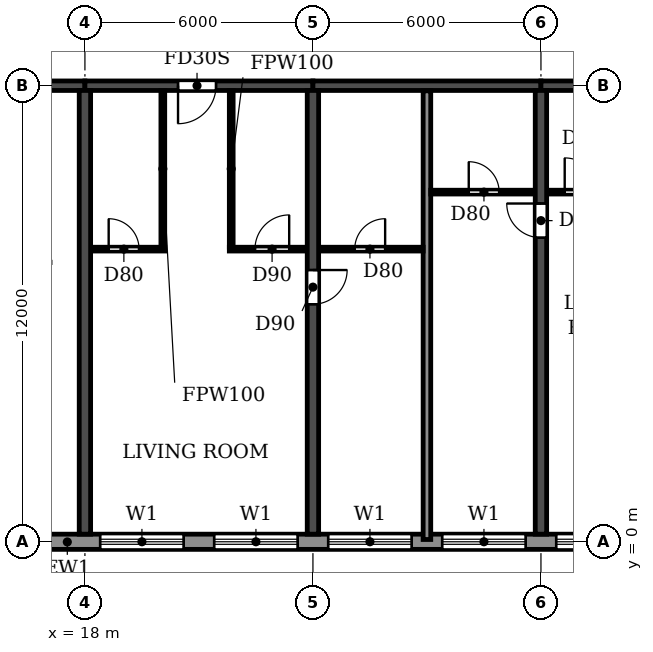
"""IFC4 building model, lengths in metres.
Left out: names, types, materials, properties, quantities, classifications, styles, units other than length and angle.
Written with IfcOpenShell. Run it as: python <this file> out.ifc"""

import sys

from ifc_helpers import new_model, si_unit, direction, frame, frame_2d, origin, place, context, subcontext, project, spatial, rectangle, extrude, element, fill, save


model = new_model("IFC4")
c1 = context("Model", 3, precision=1e-05, world=origin(), true_north=direction((0.0, 1.0)))
c2 = subcontext(c1, "Body", "Model", "MODEL_VIEW")
j1 = project(units=[si_unit("LENGTHUNIT", "METRE"), si_unit("PLANEANGLEUNIT", "RADIAN")], contexts=[c1])
p1 = place(None, origin())
s1 = spatial("IfcSite", under=j1, at=p1, CompositionType="ELEMENT")
p2 = place(p1, origin())
s2 = spatial("IfcBuilding", under=s1, at=p2, CompositionType="ELEMENT")
p3 = place(p2, frame((0.0, 0.0, 125.7)))
s3 = spatial("IfcBuildingStorey", under=s2, at=p3, CompositionType="ELEMENT", Elevation=125.7)
p4 = place(p3, frame((18.0, 0.2, 0.0), z_axis=(0.0, 0.0, 1.0), x_axis=(0.0, 1.0, 0.0)))
e1 = element("IfcWall", 1, at=p4, inside=s3, PredefinedType="SHEAR", context=c2, shape_type="SweptSolid", body=[
    extrude(rectangle(XDim=11.675, YDim=0.3, at=frame_2d((5.837, 0.0))), origin(), (0.0, 0.0, 1.0), 3.07),
])
p5 = place(p3, frame((24.0, 0.2, 0.0), z_axis=(0.0, 0.0, 1.0), x_axis=(0.0, 1.0, 0.0)))
e2 = element("IfcWall", 2, at=p5, inside=s3, PredefinedType="SHEAR", context=c2, shape_type="SweptSolid", body=[
    extrude(rectangle(XDim=11.675, YDim=0.3, at=frame_2d((5.837, 0.0))), origin(), (0.0, 0.0, 1.0), 3.07),
])
p6 = place(p5, frame((6.05, 0.0, 0.0)))
e3 = element("IfcOpeningElement", 3, at=p6, cuts=e2, PredefinedType="OPENING", context=c2, shape_type="SweptSolid", body=[
    extrude(rectangle(XDim=0.9, YDim=2.1, at=frame_2d((0.45, 1.05))), frame((0.0, 0.16, 0.0), z_axis=(0.0, -1.0, 0.0), x_axis=(1.0, 0.0, 0.0)), (0.0, 0.0, 1.0), 0.32),
])
p7 = place(p3, frame((30.0, 0.2, 0.0), z_axis=(0.0, 0.0, 1.0), x_axis=(0.0, 1.0, 0.0)))
e4 = element("IfcWall", 4, at=p7, inside=s3, PredefinedType="SHEAR", context=c2, shape_type="SweptSolid", body=[
    extrude(rectangle(XDim=11.675, YDim=0.3, at=frame_2d((5.837, 0.0))), origin(), (0.0, 0.0, 1.0), 3.07),
])
p8 = place(p7, frame((7.8, 0.0, 0.0)))
e5 = element("IfcOpeningElement", 5, at=p8, cuts=e4, PredefinedType="OPENING", context=c2, shape_type="SweptSolid", body=[
    extrude(rectangle(XDim=0.9, YDim=2.1, at=frame_2d((0.45, 1.05))), frame((0.0, 0.16, 0.0), z_axis=(0.0, -1.0, 0.0), x_axis=(1.0, 0.0, 0.0)), (0.0, 0.0, 1.0), 0.32),
])
p9 = place(p3, frame((12.2, 12.0, 0.0), z_axis=(0.0, 0.0, 1.0), x_axis=(1.0, 0.0, 0.0)))
e6 = element("IfcWall", 6, at=p9, inside=s3, PredefinedType="SHEAR", context=c2, shape_type="SweptSolid", body=[
    extrude(rectangle(XDim=5.8, YDim=0.25, at=frame_2d((2.9, 0.0))), origin(), (0.0, 0.0, 1.0), 2.47),
])
p10 = place(p9, frame((2.3, 0.0, 0.0)))
e7 = element("IfcOpeningElement", 7, at=p10, cuts=e6, PredefinedType="OPENING", context=c2, shape_type="SweptSolid", body=[
    extrude(rectangle(XDim=1.0, YDim=2.1, at=frame_2d((0.5, 1.05))), frame((0.0, 0.135, 0.0), z_axis=(0.0, -1.0, 0.0), x_axis=(1.0, 0.0, 0.0)), (0.0, 0.0, 1.0), 0.27),
])
p11 = place(p3, frame((18.0, 12.0, 0.0), z_axis=(0.0, 0.0, 1.0), x_axis=(1.0, 0.0, 0.0)))
e8 = element("IfcWall", 8, at=p11, inside=s3, PredefinedType="SHEAR", context=c2, shape_type="SweptSolid", body=[
    extrude(rectangle(XDim=6.0, YDim=0.25, at=frame_2d((3.0, 0.0))), origin(), (0.0, 0.0, 1.0), 2.47),
])
p12 = place(p11, frame((2.45, 0.0, 0.0)))
e9 = element("IfcOpeningElement", 9, at=p12, cuts=e8, PredefinedType="OPENING", context=c2, shape_type="SweptSolid", body=[
    extrude(rectangle(XDim=1.0, YDim=2.1, at=frame_2d((0.5, 1.05))), frame((0.0, 0.135, 0.0), z_axis=(0.0, -1.0, 0.0), x_axis=(1.0, 0.0, 0.0)), (0.0, 0.0, 1.0), 0.27),
])
p13 = place(p3, frame((24.0, 12.0, 0.0), z_axis=(0.0, 0.0, 1.0), x_axis=(1.0, 0.0, 0.0)))
e10 = element("IfcWall", 10, at=p13, inside=s3, PredefinedType="SHEAR", context=c2, shape_type="SweptSolid", body=[
    extrude(rectangle(XDim=6.0, YDim=0.25, at=frame_2d((3.0, 0.0))), origin(), (0.0, 0.0, 1.0), 2.47),
])
p14 = place(p3, frame((30.0, 12.0, 0.0), z_axis=(0.0, 0.0, 1.0), x_axis=(1.0, 0.0, 0.0)))
e11 = element("IfcWall", 11, at=p14, inside=s3, PredefinedType="SHEAR", context=c2, shape_type="SweptSolid", body=[
    extrude(rectangle(XDim=6.0, YDim=0.25, at=frame_2d((3.0, 0.0))), origin(), (0.0, 0.0, 1.0), 2.47),
])
p15 = place(p14, frame((2.55, 0.0, 0.0)))
e12 = element("IfcOpeningElement", 12, at=p15, cuts=e11, PredefinedType="OPENING", context=c2, shape_type="SweptSolid", body=[
    extrude(rectangle(XDim=1.0, YDim=2.1, at=frame_2d((0.5, 1.05))), frame((0.0, 0.135, 0.0), z_axis=(0.0, -1.0, 0.0), x_axis=(1.0, 0.0, 0.0)), (0.0, 0.0, 1.0), 0.27),
])
p16 = place(p3, frame((16.683, 0.0, 0.0), z_axis=(0.0, 0.0, 1.0), x_axis=(1.0, 0.0, 0.0)))
e13 = element("IfcWall", 13, at=p16, inside=s3, PredefinedType="STANDARD", context=c2, shape_type="SweptSolid", body=[
    extrude(rectangle(XDim=68.634, YDim=0.4, at=frame_2d((34.317, 0.0))), origin(), (0.0, 0.0, 1.0), 3.07),
])
p17 = place(p16, frame((1.717, 0.0, 0.9)))
e14 = element("IfcOpeningElement", 14, at=p17, cuts=e13, PredefinedType="OPENING", context=c2, shape_type="SweptSolid", body=[
    extrude(rectangle(XDim=2.2, YDim=1.5, at=frame_2d((1.1, 0.75))), frame((0.0, 0.21, 0.0), z_axis=(0.0, -1.0, 0.0), x_axis=(1.0, 0.0, 0.0)), (0.0, 0.0, 1.0), 0.42),
])
p18 = place(p16, frame((4.717, 0.0, 0.9)))
e15 = element("IfcOpeningElement", 15, at=p18, cuts=e13, PredefinedType="OPENING", context=c2, shape_type="SweptSolid", body=[
    extrude(rectangle(XDim=2.2, YDim=1.5, at=frame_2d((1.1, 0.75))), frame((0.0, 0.21, 0.0), z_axis=(0.0, -1.0, 0.0), x_axis=(1.0, 0.0, 0.0)), (0.0, 0.0, 1.0), 0.42),
])
p19 = place(p16, frame((7.717, 0.0, 0.9)))
e16 = element("IfcOpeningElement", 16, at=p19, cuts=e13, PredefinedType="OPENING", context=c2, shape_type="SweptSolid", body=[
    extrude(rectangle(XDim=2.2, YDim=1.5, at=frame_2d((1.1, 0.75))), frame((0.0, 0.21, 0.0), z_axis=(0.0, -1.0, 0.0), x_axis=(1.0, 0.0, 0.0)), (0.0, 0.0, 1.0), 0.42),
])
p20 = place(p16, frame((10.717, 0.0, 0.9)))
e17 = element("IfcOpeningElement", 17, at=p20, cuts=e13, PredefinedType="OPENING", context=c2, shape_type="SweptSolid", body=[
    extrude(rectangle(XDim=2.2, YDim=1.5, at=frame_2d((1.1, 0.75))), frame((0.0, 0.21, 0.0), z_axis=(0.0, -1.0, 0.0), x_axis=(1.0, 0.0, 0.0)), (0.0, 0.0, 1.0), 0.42),
])
p21 = place(p16, frame((13.717, 0.0, 0.9)))
e18 = element("IfcOpeningElement", 18, at=p21, cuts=e13, PredefinedType="OPENING", context=c2, shape_type="SweptSolid", body=[
    extrude(rectangle(XDim=2.2, YDim=1.5, at=frame_2d((1.1, 0.75))), frame((0.0, 0.21, 0.0), z_axis=(0.0, -1.0, 0.0), x_axis=(1.0, 0.0, 0.0)), (0.0, 0.0, 1.0), 0.42),
])
p22 = place(p16, frame((16.717, 0.0, 0.9)))
e19 = element("IfcOpeningElement", 19, at=p22, cuts=e13, PredefinedType="OPENING", context=c2, shape_type="SweptSolid", body=[
    extrude(rectangle(XDim=2.2, YDim=1.5, at=frame_2d((1.1, 0.75))), frame((0.0, 0.21, 0.0), z_axis=(0.0, -1.0, 0.0), x_axis=(1.0, 0.0, 0.0)), (0.0, 0.0, 1.0), 0.42),
])
p23 = place(p16, frame((19.717, 0.0, 0.9)))
e20 = element("IfcOpeningElement", 20, at=p23, cuts=e13, PredefinedType="OPENING", context=c2, shape_type="SweptSolid", body=[
    extrude(rectangle(XDim=2.2, YDim=1.5, at=frame_2d((1.1, 0.75))), frame((0.0, 0.21, 0.0), z_axis=(0.0, -1.0, 0.0), x_axis=(1.0, 0.0, 0.0)), (0.0, 0.0, 1.0), 0.42),
])
p24 = place(p16, frame((22.917, 0.0, 0.0)))
e21 = element("IfcOpeningElement", 21, at=p24, cuts=e13, PredefinedType="OPENING", context=c2, shape_type="SweptSolid", body=[
    extrude(rectangle(XDim=1.8, YDim=2.4, at=frame_2d((0.9, 1.2))), frame((0.0, 0.21, 0.0), z_axis=(0.0, -1.0, 0.0), x_axis=(1.0, 0.0, 0.0)), (0.0, 0.0, 1.0), 0.42),
])
p25 = place(p16, frame((25.717, 0.0, 0.9)))
e22 = element("IfcOpeningElement", 22, at=p25, cuts=e13, PredefinedType="OPENING", context=c2, shape_type="SweptSolid", body=[
    extrude(rectangle(XDim=2.2, YDim=1.5, at=frame_2d((1.1, 0.75))), frame((0.0, 0.21, 0.0), z_axis=(0.0, -1.0, 0.0), x_axis=(1.0, 0.0, 0.0)), (0.0, 0.0, 1.0), 0.42),
])
p26 = place(p16, frame((28.717, 0.0, 0.9)))
e23 = element("IfcOpeningElement", 23, at=p26, cuts=e13, PredefinedType="OPENING", context=c2, shape_type="SweptSolid", body=[
    extrude(rectangle(XDim=2.2, YDim=1.5, at=frame_2d((1.1, 0.75))), frame((0.0, 0.21, 0.0), z_axis=(0.0, -1.0, 0.0), x_axis=(1.0, 0.0, 0.0)), (0.0, 0.0, 1.0), 0.42),
])
p27 = place(p16, frame((31.717, 0.0, 0.9)))
e24 = element("IfcOpeningElement", 24, at=p27, cuts=e13, PredefinedType="OPENING", context=c2, shape_type="SweptSolid", body=[
    extrude(rectangle(XDim=2.2, YDim=1.5, at=frame_2d((1.1, 0.75))), frame((0.0, 0.21, 0.0), z_axis=(0.0, -1.0, 0.0), x_axis=(1.0, 0.0, 0.0)), (0.0, 0.0, 1.0), 0.42),
])
p28 = place(p16, frame((34.917, 0.0, 0.0)))
e25 = element("IfcOpeningElement", 25, at=p28, cuts=e13, PredefinedType="OPENING", context=c2, shape_type="SweptSolid", body=[
    extrude(rectangle(XDim=1.8, YDim=2.4, at=frame_2d((0.9, 1.2))), frame((0.0, 0.21, 0.0), z_axis=(0.0, -1.0, 0.0), x_axis=(1.0, 0.0, 0.0)), (0.0, 0.0, 1.0), 0.42),
])
p29 = place(p16, frame((37.717, 0.0, 0.9)))
e26 = element("IfcOpeningElement", 26, at=p29, cuts=e13, PredefinedType="OPENING", context=c2, shape_type="SweptSolid", body=[
    extrude(rectangle(XDim=2.2, YDim=1.5, at=frame_2d((1.1, 0.75))), frame((0.0, 0.21, 0.0), z_axis=(0.0, -1.0, 0.0), x_axis=(1.0, 0.0, 0.0)), (0.0, 0.0, 1.0), 0.42),
])
p30 = place(p16, frame((40.717, 0.0, 0.9)))
e27 = element("IfcOpeningElement", 27, at=p30, cuts=e13, PredefinedType="OPENING", context=c2, shape_type="SweptSolid", body=[
    extrude(rectangle(XDim=2.2, YDim=1.5, at=frame_2d((1.1, 0.75))), frame((0.0, 0.21, 0.0), z_axis=(0.0, -1.0, 0.0), x_axis=(1.0, 0.0, 0.0)), (0.0, 0.0, 1.0), 0.42),
])
p31 = place(p16, frame((43.717, 0.0, 0.9)))
e28 = element("IfcOpeningElement", 28, at=p31, cuts=e13, PredefinedType="OPENING", context=c2, shape_type="SweptSolid", body=[
    extrude(rectangle(XDim=2.2, YDim=1.5, at=frame_2d((1.1, 0.75))), frame((0.0, 0.21, 0.0), z_axis=(0.0, -1.0, 0.0), x_axis=(1.0, 0.0, 0.0)), (0.0, 0.0, 1.0), 0.42),
])
p32 = place(p16, frame((46.917, 0.0, 0.0)))
e29 = element("IfcOpeningElement", 29, at=p32, cuts=e13, PredefinedType="OPENING", context=c2, shape_type="SweptSolid", body=[
    extrude(rectangle(XDim=1.8, YDim=2.4, at=frame_2d((0.9, 1.2))), frame((0.0, 0.21, 0.0), z_axis=(0.0, -1.0, 0.0), x_axis=(1.0, 0.0, 0.0)), (0.0, 0.0, 1.0), 0.42),
])
p33 = place(p16, frame((49.717, 0.0, 0.9)))
e30 = element("IfcOpeningElement", 30, at=p33, cuts=e13, PredefinedType="OPENING", context=c2, shape_type="SweptSolid", body=[
    extrude(rectangle(XDim=2.2, YDim=1.5, at=frame_2d((1.1, 0.75))), frame((0.0, 0.21, 0.0), z_axis=(0.0, -1.0, 0.0), x_axis=(1.0, 0.0, 0.0)), (0.0, 0.0, 1.0), 0.42),
])
p34 = place(p16, frame((52.717, 0.0, 0.9)))
e31 = element("IfcOpeningElement", 31, at=p34, cuts=e13, PredefinedType="OPENING", context=c2, shape_type="SweptSolid", body=[
    extrude(rectangle(XDim=2.2, YDim=1.5, at=frame_2d((1.1, 0.75))), frame((0.0, 0.21, 0.0), z_axis=(0.0, -1.0, 0.0), x_axis=(1.0, 0.0, 0.0)), (0.0, 0.0, 1.0), 0.42),
])
p35 = place(p16, frame((55.717, 0.0, 0.9)))
e32 = element("IfcOpeningElement", 32, at=p35, cuts=e13, PredefinedType="OPENING", context=c2, shape_type="SweptSolid", body=[
    extrude(rectangle(XDim=2.2, YDim=1.5, at=frame_2d((1.1, 0.75))), frame((0.0, 0.21, 0.0), z_axis=(0.0, -1.0, 0.0), x_axis=(1.0, 0.0, 0.0)), (0.0, 0.0, 1.0), 0.42),
])
p36 = place(p16, frame((58.917, 0.0, 0.0)))
e33 = element("IfcOpeningElement", 33, at=p36, cuts=e13, PredefinedType="OPENING", context=c2, shape_type="SweptSolid", body=[
    extrude(rectangle(XDim=1.8, YDim=2.4, at=frame_2d((0.9, 1.2))), frame((0.0, 0.21, 0.0), z_axis=(0.0, -1.0, 0.0), x_axis=(1.0, 0.0, 0.0)), (0.0, 0.0, 1.0), 0.42),
])
p37 = place(p16, frame((61.717, 0.0, 0.9)))
e34 = element("IfcOpeningElement", 34, at=p37, cuts=e13, PredefinedType="OPENING", context=c2, shape_type="SweptSolid", body=[
    extrude(rectangle(XDim=2.2, YDim=1.5, at=frame_2d((1.1, 0.75))), frame((0.0, 0.21, 0.0), z_axis=(0.0, -1.0, 0.0), x_axis=(1.0, 0.0, 0.0)), (0.0, 0.0, 1.0), 0.42),
])
p38 = place(p16, frame((64.717, 0.0, 0.9)))
e35 = element("IfcOpeningElement", 35, at=p38, cuts=e13, PredefinedType="OPENING", context=c2, shape_type="SweptSolid", body=[
    extrude(rectangle(XDim=2.2, YDim=1.5, at=frame_2d((1.1, 0.75))), frame((0.0, 0.21, 0.0), z_axis=(0.0, -1.0, 0.0), x_axis=(1.0, 0.0, 0.0)), (0.0, 0.0, 1.0), 0.42),
])
p39 = place(p3, frame((27.0, 0.06, 0.0), z_axis=(0.0, 0.0, 1.0), x_axis=(0.0, 1.0, 0.0)))
e36 = element("IfcWall", 36, at=p39, inside=s3, PredefinedType="PARTITIONING", context=c2, shape_type="SweptSolid", body=[
    extrude(rectangle(XDim=11.805, YDim=0.2, at=frame_2d((5.902, 0.0))), origin(), (0.0, 0.0, 1.0), 3.07),
])
p40 = place(p3, frame((18.16, 7.7, 0.0), z_axis=(0.0, 0.0, 1.0), x_axis=(1.0, 0.0, 0.0)))
e37 = element("IfcWall", 37, at=p40, inside=s3, PredefinedType="PARTITIONING", context=c2, shape_type="SweptSolid", body=[
    extrude(rectangle(XDim=1.94, YDim=0.1, at=frame_2d((0.97, 0.0))), origin(), (0.0, 0.0, 1.0), 3.07),
])
p41 = place(p40, frame((0.465, 0.0, 0.0)))
e38 = element("IfcOpeningElement", 38, at=p41, cuts=e37, PredefinedType="OPENING", context=c2, shape_type="SweptSolid", body=[
    extrude(rectangle(XDim=0.8, YDim=2.1, at=frame_2d((0.4, 1.05))), frame((0.0, 0.06, 0.0), z_axis=(0.0, -1.0, 0.0), x_axis=(1.0, 0.0, 0.0)), (0.0, 0.0, 1.0), 0.12),
])
p42 = place(p3, frame((21.8, 7.7, 0.0), z_axis=(0.0, 0.0, 1.0), x_axis=(1.0, 0.0, 0.0)))
e39 = element("IfcWall", 39, at=p42, inside=s3, PredefinedType="PARTITIONING", context=c2, shape_type="SweptSolid", body=[
    extrude(rectangle(XDim=2.04, YDim=0.1, at=frame_2d((1.02, 0.0))), origin(), (0.0, 0.0, 1.0), 3.07),
])
p43 = place(p42, frame((0.675, 0.0, 0.0)))
e40 = element("IfcOpeningElement", 40, at=p43, cuts=e39, PredefinedType="OPENING", context=c2, shape_type="SweptSolid", body=[
    extrude(rectangle(XDim=0.9, YDim=2.1, at=frame_2d((0.45, 1.05))), frame((0.0, 0.06, 0.0), z_axis=(0.0, -1.0, 0.0), x_axis=(1.0, 0.0, 0.0)), (0.0, 0.0, 1.0), 0.12),
])
p44 = place(p3, frame((24.16, 7.7, 0.0), z_axis=(0.0, 0.0, 1.0), x_axis=(1.0, 0.0, 0.0)))
e41 = element("IfcWall", 41, at=p44, inside=s3, PredefinedType="PARTITIONING", context=c2, shape_type="SweptSolid", body=[
    extrude(rectangle(XDim=2.74, YDim=0.1, at=frame_2d((1.37, 0.0))), origin(), (0.0, 0.0, 1.0), 3.07),
])
p45 = place(p44, frame((0.94, 0.0, 0.0)))
e42 = element("IfcOpeningElement", 42, at=p45, cuts=e41, PredefinedType="OPENING", context=c2, shape_type="SweptSolid", body=[
    extrude(rectangle(XDim=0.8, YDim=2.1, at=frame_2d((0.4, 1.05))), frame((0.0, 0.06, 0.0), z_axis=(0.0, -1.0, 0.0), x_axis=(1.0, 0.0, 0.0)), (0.0, 0.0, 1.0), 0.12),
])
p46 = place(p3, frame((27.1, 9.2, 0.0), z_axis=(0.0, 0.0, 1.0), x_axis=(1.0, 0.0, 0.0)))
e43 = element("IfcWall", 43, at=p46, inside=s3, PredefinedType="PARTITIONING", context=c2, shape_type="SweptSolid", body=[
    extrude(rectangle(XDim=2.74, YDim=0.1, at=frame_2d((1.37, 0.0))), origin(), (0.0, 0.0, 1.0), 3.07),
])
p47 = place(p46, frame((1.0, 0.0, 0.0)))
e44 = element("IfcOpeningElement", 44, at=p47, cuts=e43, PredefinedType="OPENING", context=c2, shape_type="SweptSolid", body=[
    extrude(rectangle(XDim=0.8, YDim=2.1, at=frame_2d((0.4, 1.05))), frame((0.0, 0.06, 0.0), z_axis=(0.0, -1.0, 0.0), x_axis=(1.0, 0.0, 0.0)), (0.0, 0.0, 1.0), 0.12),
])
p48 = place(p3, frame((30.16, 9.2, 0.0), z_axis=(0.0, 0.0, 1.0), x_axis=(1.0, 0.0, 0.0)))
e45 = element("IfcWall", 45, at=p48, inside=s3, PredefinedType="PARTITIONING", context=c2, shape_type="SweptSolid", body=[
    extrude(rectangle(XDim=2.04, YDim=0.1, at=frame_2d((1.02, 0.0))), origin(), (0.0, 0.0, 1.0), 3.07),
])
p49 = place(p48, frame((0.465, 0.0, 0.0)))
e46 = element("IfcOpeningElement", 46, at=p49, cuts=e45, PredefinedType="OPENING", context=c2, shape_type="SweptSolid", body=[
    extrude(rectangle(XDim=0.9, YDim=2.1, at=frame_2d((0.45, 1.05))), frame((0.0, 0.06, 0.0), z_axis=(0.0, -1.0, 0.0), x_axis=(1.0, 0.0, 0.0)), (0.0, 0.0, 1.0), 0.12),
])
for number, where, z_axis, x_axis in (
    (47, (20.05, 7.75, 0.0), (0.0, 0.0, 1.0), (0.0, 1.0, 0.0)),
    (48, (21.85, 7.75, 0.0), (0.0, 0.0, 1.0), (0.0, 1.0, 0.0)),
):
    element("IfcWall", number, at=place(p3, frame(where, z_axis=z_axis, x_axis=x_axis)), inside=s3, PredefinedType="PARTITIONING", context=c2, shape_type="SweptSolid", body=[
        extrude(rectangle(XDim=4.115, YDim=0.1, at=frame_2d((2.058, 0.0))), origin(), (0.0, 0.0, 1.0), 3.07),
    ])
p50 = place(p17, origin())
e49 = element("IfcWindow", 49, at=p50, inside=s3, PartitioningType="DOUBLE_PANEL_HORIZONTAL", PredefinedType="WINDOW", context=c2, shape_type="SweptSolid", body=[
    extrude(rectangle(XDim=2.2, YDim=1.5, at=frame_2d((1.1, 0.75))), frame((0.0, 0.03, 0.0), z_axis=(0.0, -1.0, 0.0), x_axis=(1.0, 0.0, 0.0)), (0.0, 0.0, 1.0), 0.06),
])
fill(e14, e49)
p51 = place(p18, origin())
e50 = element("IfcWindow", 50, at=p51, inside=s3, PartitioningType="DOUBLE_PANEL_HORIZONTAL", PredefinedType="WINDOW", context=c2, shape_type="SweptSolid", body=[
    extrude(rectangle(XDim=2.2, YDim=1.5, at=frame_2d((1.1, 0.75))), frame((0.0, 0.03, 0.0), z_axis=(0.0, -1.0, 0.0), x_axis=(1.0, 0.0, 0.0)), (0.0, 0.0, 1.0), 0.06),
])
fill(e15, e50)
p52 = place(p19, origin())
e51 = element("IfcWindow", 51, at=p52, inside=s3, PartitioningType="DOUBLE_PANEL_HORIZONTAL", PredefinedType="WINDOW", context=c2, shape_type="SweptSolid", body=[
    extrude(rectangle(XDim=2.2, YDim=1.5, at=frame_2d((1.1, 0.75))), frame((0.0, 0.03, 0.0), z_axis=(0.0, -1.0, 0.0), x_axis=(1.0, 0.0, 0.0)), (0.0, 0.0, 1.0), 0.06),
])
fill(e16, e51)
p53 = place(p20, origin())
e52 = element("IfcWindow", 52, at=p53, inside=s3, PartitioningType="DOUBLE_PANEL_HORIZONTAL", PredefinedType="WINDOW", context=c2, shape_type="SweptSolid", body=[
    extrude(rectangle(XDim=2.2, YDim=1.5, at=frame_2d((1.1, 0.75))), frame((0.0, 0.03, 0.0), z_axis=(0.0, -1.0, 0.0), x_axis=(1.0, 0.0, 0.0)), (0.0, 0.0, 1.0), 0.06),
])
fill(e17, e52)
p54 = place(p21, origin())
e53 = element("IfcWindow", 53, at=p54, inside=s3, PartitioningType="DOUBLE_PANEL_HORIZONTAL", PredefinedType="WINDOW", context=c2, shape_type="SweptSolid", body=[
    extrude(rectangle(XDim=2.2, YDim=1.5, at=frame_2d((1.1, 0.75))), frame((0.0, 0.03, 0.0), z_axis=(0.0, -1.0, 0.0), x_axis=(1.0, 0.0, 0.0)), (0.0, 0.0, 1.0), 0.06),
])
fill(e18, e53)
p55 = place(p45, origin())
e54 = element("IfcDoor", 54, at=p55, inside=s3, OperationType="SINGLE_SWING_RIGHT", PredefinedType="DOOR", context=c2, shape_type="SweptSolid", body=[
    extrude(rectangle(XDim=0.8, YDim=2.1, at=frame_2d((0.4, 1.05))), frame((0.0, 0.025, 0.0), z_axis=(0.0, -1.0, 0.0), x_axis=(1.0, 0.0, 0.0)), (0.0, 0.0, 1.0), 0.05),
])
fill(e42, e54)
p56 = place(p41, origin())
e55 = element("IfcDoor", 55, at=p56, inside=s3, OperationType="SINGLE_SWING_LEFT", PredefinedType="DOOR", context=c2, shape_type="SweptSolid", body=[
    extrude(rectangle(XDim=0.8, YDim=2.1, at=frame_2d((0.4, 1.05))), frame((0.0, 0.025, 0.0), z_axis=(0.0, -1.0, 0.0), x_axis=(1.0, 0.0, 0.0)), (0.0, 0.0, 1.0), 0.05),
])
fill(e38, e55)
p57 = place(p12, frame((1.0, 0.0, 0.0), z_axis=(0.0, 0.0, 1.0), x_axis=(-1.0, 0.0, 0.0)))
e56 = element("IfcDoor", 56, at=p57, inside=s3, OperationType="SINGLE_SWING_RIGHT", PredefinedType="DOOR", context=c2, shape_type="SweptSolid", body=[
    extrude(rectangle(XDim=1.0, YDim=2.1, at=frame_2d((0.5, 1.05))), frame((0.0, 0.025, 0.0), z_axis=(0.0, -1.0, 0.0), x_axis=(1.0, 0.0, 0.0)), (0.0, 0.0, 1.0), 0.05),
])
fill(e9, e56)
p58 = place(p43, origin())
e57 = element("IfcDoor", 57, at=p58, inside=s3, OperationType="SINGLE_SWING_RIGHT", PredefinedType="DOOR", context=c2, shape_type="SweptSolid", body=[
    extrude(rectangle(XDim=0.9, YDim=2.1, at=frame_2d((0.45, 1.05))), frame((0.0, 0.025, 0.0), z_axis=(0.0, -1.0, 0.0), x_axis=(1.0, 0.0, 0.0)), (0.0, 0.0, 1.0), 0.05),
])
fill(e40, e57)
p59 = place(p6, frame((0.9, 0.0, 0.0), z_axis=(0.0, 0.0, 1.0), x_axis=(-1.0, 0.0, 0.0)))
e58 = element("IfcDoor", 58, at=p59, inside=s3, OperationType="SINGLE_SWING_LEFT", PredefinedType="DOOR", context=c2, shape_type="SweptSolid", body=[
    extrude(rectangle(XDim=0.9, YDim=2.1, at=frame_2d((0.45, 1.05))), frame((0.0, 0.025, 0.0), z_axis=(0.0, -1.0, 0.0), x_axis=(1.0, 0.0, 0.0)), (0.0, 0.0, 1.0), 0.05),
])
fill(e3, e58)
p60 = place(p47, origin())
e59 = element("IfcDoor", 59, at=p60, inside=s3, OperationType="SINGLE_SWING_LEFT", PredefinedType="DOOR", context=c2, shape_type="SweptSolid", body=[
    extrude(rectangle(XDim=0.8, YDim=2.1, at=frame_2d((0.4, 1.05))), frame((0.0, 0.025, 0.0), z_axis=(0.0, -1.0, 0.0), x_axis=(1.0, 0.0, 0.0)), (0.0, 0.0, 1.0), 0.05),
])
fill(e44, e59)
p61 = place(p8, origin())
e60 = element("IfcDoor", 60, at=p61, inside=s3, OperationType="SINGLE_SWING_RIGHT", PredefinedType="DOOR", context=c2, shape_type="SweptSolid", body=[
    extrude(rectangle(XDim=0.9, YDim=2.1, at=frame_2d((0.45, 1.05))), frame((0.0, 0.025, 0.0), z_axis=(0.0, -1.0, 0.0), x_axis=(1.0, 0.0, 0.0)), (0.0, 0.0, 1.0), 0.05),
])
fill(e5, e60)
p62 = place(p49, origin())
e61 = element("IfcDoor", 61, at=p62, inside=s3, OperationType="SINGLE_SWING_LEFT", PredefinedType="DOOR", context=c2, shape_type="SweptSolid", body=[
    extrude(rectangle(XDim=0.9, YDim=2.1, at=frame_2d((0.45, 1.05))), frame((0.0, 0.025, 0.0), z_axis=(0.0, -1.0, 0.0), x_axis=(1.0, 0.0, 0.0)), (0.0, 0.0, 1.0), 0.05),
])
fill(e46, e61)
save(model, sys.argv[1])
